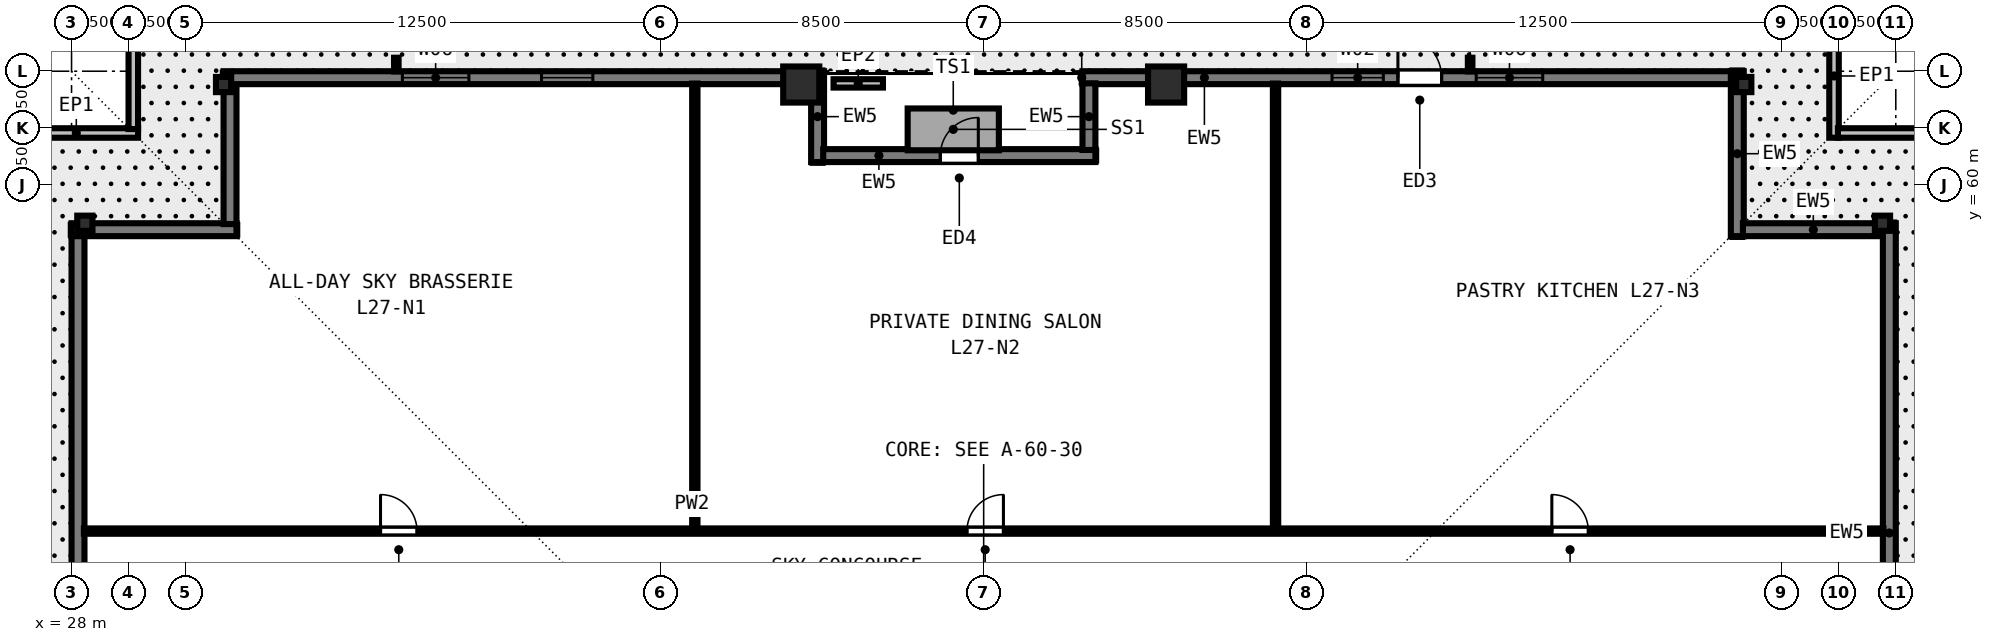
"""IFC4 building model, lengths in metres.
Left out: names, types, materials, properties, quantities, classifications, styles, units other than length and angle.
Written with IfcOpenShell. Run it as: python <this file> out.ifc"""

import sys

from ifc_helpers import new_model, si_unit, direction, frame, frame_2d, origin, origin_2d, place, context, subcontext, project, spatial, rectangle, i_section, extrude, element, fill, save


model = new_model("IFC4")
c1 = context("Model", 3, precision=1e-05, world=origin(), true_north=direction((0.0, 1.0)))
c2 = subcontext(c1, "Body", "Model", "MODEL_VIEW")
j1 = project(units=[si_unit("LENGTHUNIT", "METRE"), si_unit("PLANEANGLEUNIT", "RADIAN")], contexts=[c1])
p1 = place(None, origin())
s1 = spatial("IfcSite", under=j1, at=p1, CompositionType="ELEMENT")
p2 = place(p1, origin())
s2 = spatial("IfcBuilding", under=s1, at=p2, CompositionType="ELEMENT")
p3 = place(p2, frame((0.0, 0.0, 101.5)))
s3 = spatial("IfcBuildingStorey", under=s2, at=p3, CompositionType="ELEMENT", Elevation=101.5)
for number, where, z_axis, x_axis in (
    (1, (75.65, 59.0, 0.0), (0.0, 0.0, 1.0), (0.0, 1.0, 0.0)),
    (2, (72.0, 62.65, 0.0), (0.0, 0.0, 1.0), (1.0, 0.0, 0.0)),
):
    element("IfcColumn", number, at=place(p3, frame(where, z_axis=z_axis, x_axis=x_axis)), inside=s3, PredefinedType="COLUMN", context=c2, shape_type="SweptSolid", body=[
        extrude(i_section(OverallWidth=0.4, OverallDepth=0.4, WebThickness=0.022, FlangeThickness=0.036, at=origin_2d()), origin(), (0.0, 0.0, 1.0), 4.5),
    ])
for number, where, z_axis, x_axis in (
    (3, (56.8, 62.65, 0.0), (0.0, 0.0, 1.0), (1.0, 0.0, 0.0)),
    (4, (47.2, 62.65, 0.0), (0.0, 0.0, 1.0), (1.0, 0.0, 0.0)),
):
    element("IfcColumn", number, at=place(p3, frame(where, z_axis=z_axis, x_axis=x_axis)), inside=s3, PredefinedType="COLUMN", context=c2, shape_type="SweptSolid", body=[
        extrude(rectangle(XDim=0.95, YDim=0.95, at=origin_2d()), origin(), (0.0, 0.0, 1.0), 4.5),
    ])
for number, where, z_axis, x_axis in (
    (5, (32.0, 62.65, 0.0), (0.0, 0.0, 1.0), (1.0, 0.0, 0.0)),
    (6, (28.35, 59.0, 0.0), (0.0, 0.0, 1.0), (0.0, 1.0, 0.0)),
):
    element("IfcColumn", number, at=place(p3, frame(where, z_axis=z_axis, x_axis=x_axis)), inside=s3, PredefinedType="COLUMN", context=c2, shape_type="SweptSolid", body=[
        extrude(i_section(OverallWidth=0.4, OverallDepth=0.4, WebThickness=0.022, FlangeThickness=0.036, at=origin_2d()), origin(), (0.0, 0.0, 1.0), 4.5),
    ])
p4 = place(p3, frame((26.5, 61.375, 0.0), z_axis=(0.0, 0.0, 1.0), x_axis=(1.0, 0.0, 0.0)))
e7 = element("IfcWall", 7, at=p4, inside=s3, PredefinedType="PARAPET", context=c2, shape_type="SweptSolid", body=[
    extrude(rectangle(XDim=3.25, YDim=0.25, at=frame_2d((1.625, 0.0))), origin(), (0.0, 0.0, 1.0), 1.15),
])
p5 = place(p3, frame((29.625, 61.478, 0.0), z_axis=(0.0, 0.0, 1.0), x_axis=(0.0, 1.0, 0.0)))
e8 = element("IfcWall", 8, at=p5, inside=s3, PredefinedType="PARAPET", context=c2, shape_type="SweptSolid", body=[
    extrude(rectangle(XDim=2.794, YDim=0.25, at=frame_2d((1.397, 0.0))), origin(), (0.0, 0.0, 1.0), 1.15),
])
p6 = place(p3, frame((74.375, 64.5, 0.0), z_axis=(0.0, 0.0, 1.0), x_axis=(0.0, -1.0, 0.0)))
e9 = element("IfcWall", 9, at=p6, inside=s3, PredefinedType="PARAPET", context=c2, shape_type="SweptSolid", body=[
    extrude(rectangle(XDim=3.25, YDim=0.25, at=frame_2d((1.625, 0.0))), origin(), (0.0, 0.0, 1.0), 1.15),
])
p7 = place(p3, frame((74.478, 61.375, 0.0), z_axis=(0.0, 0.0, 1.0), x_axis=(1.0, 0.0, 0.0)))
e10 = element("IfcWall", 10, at=p7, inside=s3, PredefinedType="PARAPET", context=c2, shape_type="SweptSolid", body=[
    extrude(rectangle(XDim=2.794, YDim=0.25, at=frame_2d((1.397, 0.0))), origin(), (0.0, 0.0, 1.0), 1.15),
])
p8 = place(p3, frame((54.6, 62.83, 0.0), z_axis=(0.0, 0.0, 1.0), x_axis=(1.0, 0.0, 0.0)))
e11 = element("IfcWall", 11, at=p8, inside=s3, PredefinedType="SOLIDWALL", context=c2, shape_type="SweptSolid", body=[
    extrude(rectangle(XDim=17.082, YDim=0.34, at=frame_2d((8.541, 0.0))), origin(), (0.0, 0.0, 1.0), 4.28),
])
p9 = place(p8, frame((6.566, 0.0, 0.8)))
e12 = element("IfcOpeningElement", 12, at=p9, cuts=e11, PredefinedType="OPENING", context=c2, shape_type="SweptSolid", body=[
    extrude(rectangle(XDim=1.35, YDim=1.8, at=frame_2d((0.675, 0.9))), frame((0.0, 0.18, 0.0), z_axis=(0.0, -1.0, 0.0), x_axis=(1.0, 0.0, 0.0)), (0.0, 0.0, 1.0), 0.36),
])
p10 = place(p8, frame((10.36, 0.0, 0.8)))
e13 = element("IfcOpeningElement", 13, at=p10, cuts=e11, PredefinedType="OPENING", context=c2, shape_type="SweptSolid", body=[
    extrude(rectangle(XDim=1.75, YDim=1.8, at=frame_2d((0.875, 0.9))), frame((0.0, 0.18, 0.0), z_axis=(0.0, -1.0, 0.0), x_axis=(1.0, 0.0, 0.0)), (0.0, 0.0, 1.0), 0.36),
])
p11 = place(p8, frame((8.3, 0.0, 0.0)))
e14 = element("IfcOpeningElement", 14, at=p11, cuts=e11, PredefinedType="OPENING", context=c2, shape_type="SweptSolid", body=[
    extrude(rectangle(XDim=1.15, YDim=2.15, at=frame_2d((0.575, 1.075))), frame((0.0, 0.18, 0.0), z_axis=(0.0, -1.0, 0.0), x_axis=(1.0, 0.0, 0.0)), (0.0, 0.0, 1.0), 0.36),
])
p12 = place(p3, frame((71.83, 63.0, 0.0), z_axis=(0.0, 0.0, 1.0), x_axis=(0.0, -1.0, 0.0)))
e15 = element("IfcWall", 15, at=p12, inside=s3, PredefinedType="SOLIDWALL", context=c2, shape_type="SweptSolid", body=[
    extrude(rectangle(XDim=4.34, YDim=0.34, at=frame_2d((2.17, 0.0))), origin(), (0.0, 0.0, 1.0), 4.28),
])
p13 = place(p3, frame((71.978, 58.83, 0.0), z_axis=(0.0, 0.0, 1.0), x_axis=(1.0, 0.0, 0.0)))
e16 = element("IfcWall", 16, at=p13, inside=s3, PredefinedType="SOLIDWALL", context=c2, shape_type="SweptSolid", body=[
    extrude(rectangle(XDim=3.704, YDim=0.34, at=frame_2d((1.852, 0.0))), origin(), (0.0, 0.0, 1.0), 4.28),
])
p14 = place(p3, frame((75.83, 59.0, 0.0), z_axis=(0.0, 0.0, 1.0), x_axis=(0.0, -1.0, 0.0)))
e17 = element("IfcWall", 17, at=p14, inside=s3, PredefinedType="SOLIDWALL", context=c2, shape_type="SweptSolid", body=[
    extrude(rectangle(XDim=16.3, YDim=0.34, at=frame_2d((8.15, 0.0))), origin(), (0.0, 0.0, 1.0), 4.28),
])
p15 = place(p3, frame((28.17, 42.7, 0.0), z_axis=(0.0, 0.0, 1.0), x_axis=(0.0, 1.0, 0.0)))
e18 = element("IfcWall", 18, at=p15, inside=s3, PredefinedType="SOLIDWALL", context=c2, shape_type="SweptSolid", body=[
    extrude(rectangle(XDim=15.982, YDim=0.34, at=frame_2d((7.991, 0.0))), origin(), (0.0, 0.0, 1.0), 4.28),
])
p16 = place(p3, frame((28.0, 58.83, 0.0), z_axis=(0.0, 0.0, 1.0), x_axis=(1.0, 0.0, 0.0)))
e19 = element("IfcWall", 19, at=p16, inside=s3, PredefinedType="SOLIDWALL", context=c2, shape_type="SweptSolid", body=[
    extrude(rectangle(XDim=4.34, YDim=0.34, at=frame_2d((2.17, 0.0))), origin(), (0.0, 0.0, 1.0), 4.28),
])
p17 = place(p3, frame((32.17, 58.978, 0.0), z_axis=(0.0, 0.0, 1.0), x_axis=(0.0, 1.0, 0.0)))
e20 = element("IfcWall", 20, at=p17, inside=s3, PredefinedType="SOLIDWALL", context=c2, shape_type="SweptSolid", body=[
    extrude(rectangle(XDim=3.704, YDim=0.34, at=frame_2d((1.852, 0.0))), origin(), (0.0, 0.0, 1.0), 4.28),
])
p18 = place(p3, frame((32.0, 62.83, 0.0), z_axis=(0.0, 0.0, 1.0), x_axis=(1.0, 0.0, 0.0)))
e21 = element("IfcWall", 21, at=p18, inside=s3, PredefinedType="SOLIDWALL", context=c2, shape_type="SweptSolid", body=[
    extrude(rectangle(XDim=15.482, YDim=0.34, at=frame_2d((7.741, 0.0))), origin(), (0.0, 0.0, 1.0), 4.28),
])
p19 = place(p18, frame((4.705, 0.0, 0.8)))
e22 = element("IfcOpeningElement", 22, at=p19, cuts=e21, PredefinedType="OPENING", context=c2, shape_type="SweptSolid", body=[
    extrude(rectangle(XDim=1.75, YDim=1.8, at=frame_2d((0.875, 0.9))), frame((0.0, 0.18, 0.0), z_axis=(0.0, -1.0, 0.0), x_axis=(1.0, 0.0, 0.0)), (0.0, 0.0, 1.0), 0.36),
])
p20 = place(p18, frame((8.366, 0.0, 0.8)))
e23 = element("IfcOpeningElement", 23, at=p20, cuts=e21, PredefinedType="OPENING", context=c2, shape_type="SweptSolid", body=[
    extrude(rectangle(XDim=1.35, YDim=1.8, at=frame_2d((0.675, 0.9))), frame((0.0, 0.18, 0.0), z_axis=(0.0, -1.0, 0.0), x_axis=(1.0, 0.0, 0.0)), (0.0, 0.0, 1.0), 0.36),
])
p21 = place(p3, frame((47.63, 63.0, 0.0), z_axis=(0.0, 0.0, 1.0), x_axis=(0.0, -1.0, 0.0)))
e24 = element("IfcWall", 24, at=p21, inside=s3, PredefinedType="SOLIDWALL", context=c2, shape_type="SweptSolid", body=[
    extrude(rectangle(XDim=2.39, YDim=0.34, at=frame_2d((1.195, 0.0))), origin(), (0.0, 0.0, 1.0), 4.28),
])
p22 = place(p3, frame((47.778, 60.78, 0.0), z_axis=(0.0, 0.0, 1.0), x_axis=(1.0, 0.0, 0.0)))
e25 = element("IfcWall", 25, at=p22, inside=s3, PredefinedType="SOLIDWALL", context=c2, shape_type="SweptSolid", body=[
    extrude(rectangle(XDim=7.162, YDim=0.34, at=frame_2d((3.581, 0.0))), origin(), (0.0, 0.0, 1.0), 4.28),
])
p23 = place(p22, frame((3.081, 0.0, 0.0)))
e26 = element("IfcOpeningElement", 26, at=p23, cuts=e25, PredefinedType="OPENING", context=c2, shape_type="SweptSolid", body=[
    extrude(rectangle(XDim=1.0, YDim=2.15, at=frame_2d((0.5, 1.075))), frame((0.0, 0.18, 0.0), z_axis=(0.0, -1.0, 0.0), x_axis=(1.0, 0.0, 0.0)), (0.0, 0.0, 1.0), 0.36),
])
p24 = place(p3, frame((54.77, 60.928, 0.0), z_axis=(0.0, 0.0, 1.0), x_axis=(0.0, 1.0, 0.0)))
e27 = element("IfcWall", 27, at=p24, inside=s3, PredefinedType="SOLIDWALL", context=c2, shape_type="SweptSolid", body=[
    extrude(rectangle(XDim=1.754, YDim=0.34, at=frame_2d((0.877, 0.0))), origin(), (0.0, 0.0, 1.0), 4.28),
])
p25 = place(p3, frame((48.05, 62.68, 0.0), z_axis=(0.0, 0.0, 1.0), x_axis=(1.0, 0.0, 0.0)))
e28 = element("IfcWall", 28, at=p25, inside=s3, PredefinedType="PARAPET", context=c2, shape_type="SweptSolid", body=[
    extrude(rectangle(XDim=1.3, YDim=0.22, at=frame_2d((0.65, 0.0))), origin(), (0.0, 0.0, 1.0), 0.55),
])
p26 = place(p3, frame((28.325, 50.9, 0.0), z_axis=(0.0, 0.0, 1.0), x_axis=(1.0, 0.0, 0.0)))
e29 = element("IfcWall", 29, at=p26, inside=s3, PredefinedType="PARTITIONING", context=c2, shape_type="SweptSolid", body=[
    extrude(rectangle(XDim=47.35, YDim=0.14, at=frame_2d((23.675, 0.0))), origin(), (0.0, 0.0, 1.0), 3.896),
])
p27 = place(p26, frame((7.805, 0.0, 0.0)))
e30 = element("IfcOpeningElement", 30, at=p27, cuts=e29, PredefinedType="OPENING", context=c2, shape_type="SweptSolid", body=[
    extrude(rectangle(XDim=0.96, YDim=2.12, at=frame_2d((0.48, 1.06))), frame((0.0, 0.08, 0.0), z_axis=(0.0, -1.0, 0.0), x_axis=(1.0, 0.0, 0.0)), (0.0, 0.0, 1.0), 0.16),
])
p28 = place(p26, frame((23.235, 0.0, 0.0)))
e31 = element("IfcOpeningElement", 31, at=p28, cuts=e29, PredefinedType="OPENING", context=c2, shape_type="SweptSolid", body=[
    extrude(rectangle(XDim=0.96, YDim=2.12, at=frame_2d((0.48, 1.06))), frame((0.0, 0.08, 0.0), z_axis=(0.0, -1.0, 0.0), x_axis=(1.0, 0.0, 0.0)), (0.0, 0.0, 1.0), 0.16),
])
p29 = place(p26, frame((38.625, 0.0, 0.0)))
e32 = element("IfcOpeningElement", 32, at=p29, cuts=e29, PredefinedType="OPENING", context=c2, shape_type="SweptSolid", body=[
    extrude(rectangle(XDim=0.96, YDim=2.12, at=frame_2d((0.48, 1.06))), frame((0.0, 0.08, 0.0), z_axis=(0.0, -1.0, 0.0), x_axis=(1.0, 0.0, 0.0)), (0.0, 0.0, 1.0), 0.16),
])
for number, where, z_axis, x_axis in (
    (33, (44.4, 51.0, 0.0), (0.0, 0.0, 1.0), (0.0, 1.0, 0.0)),
    (34, (59.68, 51.0, 0.0), (0.0, 0.0, 1.0), (0.0, 1.0, 0.0)),
):
    element("IfcWall", number, at=place(p3, frame(where, z_axis=z_axis, x_axis=x_axis)), inside=s3, PredefinedType="PARTITIONING", context=c2, shape_type="SweptSolid", body=[
        extrude(rectangle(XDim=11.675, YDim=0.14, at=frame_2d((5.837, 0.0))), origin(), (0.0, 0.0, 1.0), 4.28),
    ])
p30 = place(p9, origin())
e35 = element("IfcWindow", 35, at=p30, inside=s3, PartitioningType="SINGLE_PANEL", PredefinedType="WINDOW", context=c2, shape_type="SweptSolid", body=[
    extrude(rectangle(XDim=1.35, YDim=1.8, at=frame_2d((0.675, 0.9))), frame((0.0, -0.05, 0.0), z_axis=(0.0, -1.0, 0.0), x_axis=(1.0, 0.0, 0.0)), (0.0, 0.0, 1.0), 0.06),
])
fill(e12, e35)
p31 = place(p10, origin())
e36 = element("IfcWindow", 36, at=p31, inside=s3, PartitioningType="SINGLE_PANEL", PredefinedType="WINDOW", context=c2, shape_type="SweptSolid", body=[
    extrude(rectangle(XDim=1.75, YDim=1.8, at=frame_2d((0.875, 0.9))), frame((0.0, -0.05, 0.0), z_axis=(0.0, -1.0, 0.0), x_axis=(1.0, 0.0, 0.0)), (0.0, 0.0, 1.0), 0.06),
])
fill(e13, e36)
p32 = place(p19, origin())
e37 = element("IfcWindow", 37, at=p32, inside=s3, PartitioningType="SINGLE_PANEL", PredefinedType="WINDOW", context=c2, shape_type="SweptSolid", body=[
    extrude(rectangle(XDim=1.75, YDim=1.8, at=frame_2d((0.875, 0.9))), frame((0.0, -0.05, 0.0), z_axis=(0.0, -1.0, 0.0), x_axis=(1.0, 0.0, 0.0)), (0.0, 0.0, 1.0), 0.06),
])
fill(e22, e37)
p33 = place(p20, origin())
e38 = element("IfcWindow", 38, at=p33, inside=s3, PartitioningType="SINGLE_PANEL", PredefinedType="WINDOW", context=c2, shape_type="SweptSolid", body=[
    extrude(rectangle(XDim=1.35, YDim=1.8, at=frame_2d((0.675, 0.9))), frame((0.0, -0.05, 0.0), z_axis=(0.0, -1.0, 0.0), x_axis=(1.0, 0.0, 0.0)), (0.0, 0.0, 1.0), 0.06),
])
fill(e23, e38)
p34 = place(p23, origin())
e39 = element("IfcDoor", 39, at=p34, inside=s3, OperationType="SINGLE_SWING_RIGHT", PredefinedType="DOOR", context=c2, shape_type="SweptSolid", body=[
    extrude(rectangle(XDim=1.0, YDim=2.15, at=frame_2d((0.5, 1.075))), frame((0.0, 0.025, 0.0), z_axis=(0.0, -1.0, 0.0), x_axis=(1.0, 0.0, 0.0)), (0.0, 0.0, 1.0), 0.05),
])
fill(e26, e39)
p35 = place(p11, origin())
e40 = element("IfcDoor", 40, at=p35, inside=s3, OperationType="SINGLE_SWING_LEFT", PredefinedType="DOOR", context=c2, shape_type="SweptSolid", body=[
    extrude(rectangle(XDim=1.15, YDim=2.15, at=frame_2d((0.575, 1.075))), frame((0.0, 0.025, 0.0), z_axis=(0.0, -1.0, 0.0), x_axis=(1.0, 0.0, 0.0)), (0.0, 0.0, 1.0), 0.05),
])
fill(e14, e40)
p36 = place(p27, origin())
e41 = element("IfcDoor", 41, at=p36, inside=s3, OperationType="SINGLE_SWING_LEFT", PredefinedType="DOOR", context=c2, shape_type="SweptSolid", body=[
    extrude(rectangle(XDim=0.96, YDim=2.12, at=frame_2d((0.48, 1.06))), frame((0.0, 0.025, 0.0), z_axis=(0.0, -1.0, 0.0), x_axis=(1.0, 0.0, 0.0)), (0.0, 0.0, 1.0), 0.05),
])
fill(e30, e41)
p37 = place(p28, origin())
e42 = element("IfcDoor", 42, at=p37, inside=s3, OperationType="SINGLE_SWING_RIGHT", PredefinedType="DOOR", context=c2, shape_type="SweptSolid", body=[
    extrude(rectangle(XDim=0.96, YDim=2.12, at=frame_2d((0.48, 1.06))), frame((0.0, 0.025, 0.0), z_axis=(0.0, -1.0, 0.0), x_axis=(1.0, 0.0, 0.0)), (0.0, 0.0, 1.0), 0.05),
])
fill(e31, e42)
p38 = place(p29, origin())
e43 = element("IfcDoor", 43, at=p38, inside=s3, OperationType="SINGLE_SWING_LEFT", PredefinedType="DOOR", context=c2, shape_type="SweptSolid", body=[
    extrude(rectangle(XDim=0.96, YDim=2.12, at=frame_2d((0.48, 1.06))), frame((0.0, 0.025, 0.0), z_axis=(0.0, -1.0, 0.0), x_axis=(1.0, 0.0, 0.0)), (0.0, 0.0, 1.0), 0.05),
])
fill(e32, e43)
save(model, sys.argv[1])
